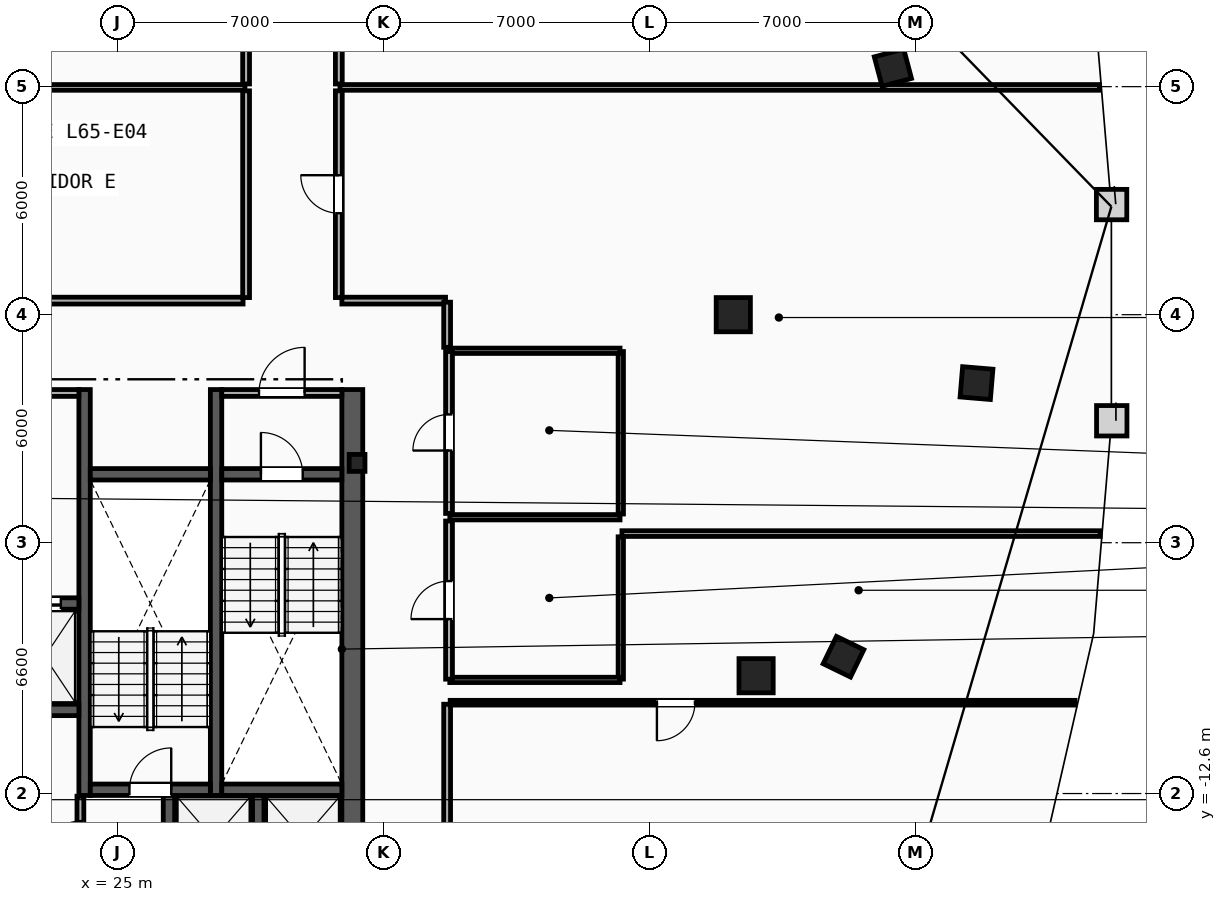
"""IFC4 building model, lengths in metres.
Left out: names, types, materials, properties, quantities, classifications, styles, units other than length and angle.
Written with IfcOpenShell. Run it as: python <this file> out.ifc"""

import sys

from ifc_helpers import new_model, si_unit, direction, frame, frame_2d, origin, origin_2d, place, context, subcontext, project, spatial, rectangle, i_section, extrude, element, fill, save


model = new_model("IFC4")
c1 = context("Model", 3, precision=1e-05, world=origin(), true_north=direction((0.0, 1.0)))
c2 = subcontext(c1, "Body", "Model", "MODEL_VIEW")
j1 = project(units=[si_unit("LENGTHUNIT", "METRE"), si_unit("PLANEANGLEUNIT", "RADIAN")], contexts=[c1])
p1 = place(None, origin())
s1 = spatial("IfcSite", under=j1, at=p1, CompositionType="ELEMENT")
p2 = place(p1, origin())
s2 = spatial("IfcBuilding", under=s1, at=p2, CompositionType="ELEMENT")
p3 = place(p2, frame((0.0, 0.0, 246.8)))
s3 = spatial("IfcBuildingStorey", under=s2, at=p3, CompositionType="ELEMENT", Elevation=246.8)
p4 = place(p3, frame((31.3, -3.9, 0.0), z_axis=(0.0, 0.0, 1.0), x_axis=(1.0, 0.0, 0.0)))
e1 = element("IfcColumn", 1, at=p4, inside=s3, PredefinedType="COLUMN", context=c2, shape_type="SweptSolid", body=[
    extrude(i_section(OverallWidth=0.416, OverallDepth=0.446, WebThickness=0.039, FlangeThickness=0.063, FilletRadius=0.018, at=origin_2d()), origin(), (0.0, 0.0, 1.0), 3.6),
])
for number, where, z_axis, x_axis in (
    (2, (41.2, 0.0, 0.0), (0.0, 0.0, 1.0), (1.0, 0.0, 0.0)),
    (3, (41.8, -9.5, 0.0), (0.0, 0.0, 1.0), (1.0, 0.0, 0.0)),
):
    element("IfcColumn", number, at=place(p3, frame(where, z_axis=z_axis, x_axis=x_axis)), inside=s3, PredefinedType="COLUMN", context=c2, shape_type="SweptSolid", body=[
        extrude(rectangle(XDim=0.9, YDim=0.9, at=origin_2d()), origin(), (0.0, 0.0, 1.0), 3.6),
    ])
for number, where, z_axis, x_axis in (
    (4, (44.1, -9.0, 0.0), (0.0, 0.0, 1.0), (0.437, 0.899, 0.0)),
    (5, (47.6, -1.8, 0.0), (0.0, 0.0, 1.0), (0.084, 0.997, 0.0)),
    (6, (45.4, 6.5, 0.0), (0.0, 0.0, 1.0), (-0.256, 0.967, 0.0)),
):
    element("IfcColumn", number, at=place(p3, frame(where, z_axis=z_axis, x_axis=x_axis)), inside=s3, PredefinedType="COLUMN", context=c2, shape_type="SweptSolid", body=[
        extrude(rectangle(XDim=0.8, YDim=0.8, at=origin_2d()), origin(), (0.0, 0.0, 1.0), 3.6),
    ])
p5 = place(p3, frame((31.175, -15.3, 0.0), z_axis=(0.0, 0.0, 1.0), x_axis=(0.0, 1.0, 0.0)))
e7 = element("IfcWall", 7, at=p5, inside=s3, PredefinedType="SHEAR", context=c2, shape_type="SweptSolid", body=[
    extrude(rectangle(XDim=13.33, YDim=0.55, at=frame_2d((6.665, 0.0))), origin(), (0.0, 0.0, 1.0), 3.34),
])
for number, where, z_axis, x_axis in (
    (8, (27.59, -12.65, 0.0), (0.0, 0.0, 1.0), (0.0, 1.0, 0.0)),
    (9, (24.13, -12.65, 0.0), (0.0, 0.0, 1.0), (0.0, 1.0, 0.0)),
):
    element("IfcWall", number, at=place(p3, frame(where, z_axis=z_axis, x_axis=x_axis)), inside=s3, PredefinedType="SHEAR", context=c2, shape_type="SweptSolid", body=[
        extrude(rectangle(XDim=10.68, YDim=0.3, at=frame_2d((5.34, 0.0))), origin(), (0.0, 0.0, 1.0), 3.34),
    ])
p6 = place(p3, frame((27.74, -4.2, 0.0), z_axis=(0.0, 0.0, 1.0), x_axis=(1.0, 0.0, 0.0)))
e10 = element("IfcWall", 10, at=p6, inside=s3, PredefinedType="SHEAR", context=c2, shape_type="SweptSolid", body=[
    extrude(rectangle(XDim=3.16, YDim=0.3, at=frame_2d((1.58, 0.0))), origin(), (0.0, 0.0, 1.0), 3.34),
])
p7 = place(p6, frame((1.03, 0.0, 0.0)))
e11 = element("IfcOpeningElement", 11, at=p7, cuts=e10, PredefinedType="OPENING", context=c2, shape_type="SweptSolid", body=[
    extrude(rectangle(XDim=1.1, YDim=2.15, at=frame_2d((0.55, 1.075))), frame((0.0, 0.16, 0.0), z_axis=(0.0, -1.0, 0.0), x_axis=(1.0, 0.0, 0.0)), (0.0, 0.0, 1.0), 0.32),
])
p8 = place(p3, frame((27.74, -12.5, 0.0), z_axis=(0.0, 0.0, 1.0), x_axis=(1.0, 0.0, 0.0)))
e12 = element("IfcWall", 12, at=p8, inside=s3, PredefinedType="SHEAR", context=c2, shape_type="SweptSolid", body=[
    extrude(rectangle(XDim=3.16, YDim=0.3, at=frame_2d((1.58, 0.0))), origin(), (0.0, 0.0, 1.0), 3.34),
])
p9 = place(p3, frame((24.28, -12.5, 0.0), z_axis=(0.0, 0.0, 1.0), x_axis=(1.0, 0.0, 0.0)))
e13 = element("IfcWall", 13, at=p9, inside=s3, PredefinedType="SHEAR", context=c2, shape_type="SweptSolid", body=[
    extrude(rectangle(XDim=3.16, YDim=0.3, at=frame_2d((1.58, 0.0))), origin(), (0.0, 0.0, 1.0), 3.34),
])
p10 = place(p9, frame((1.03, 0.0, 0.0)))
e14 = element("IfcOpeningElement", 14, at=p10, cuts=e13, PredefinedType="OPENING", context=c2, shape_type="SweptSolid", body=[
    extrude(rectangle(XDim=1.1, YDim=2.15, at=frame_2d((0.55, 1.075))), frame((0.0, 0.16, 0.0), z_axis=(0.0, -1.0, 0.0), x_axis=(1.0, 0.0, 0.0)), (0.0, 0.0, 1.0), 0.32),
])
p11 = place(p3, frame((24.28, -4.2, 0.0), z_axis=(0.0, 0.0, 1.0), x_axis=(1.0, 0.0, 0.0)))
e15 = element("IfcWall", 15, at=p11, inside=s3, PredefinedType="SHEAR", context=c2, shape_type="SweptSolid", body=[
    extrude(rectangle(XDim=3.16, YDim=0.3, at=frame_2d((1.58, 0.0))), origin(), (0.0, 0.0, 1.0), 3.34),
])
p12 = place(p3, frame((20.98, -2.06, 0.0), z_axis=(0.0, 0.0, 1.0), x_axis=(1.0, 0.0, 0.0)))
e16 = element("IfcWall", 16, at=p12, inside=s3, PredefinedType="PARTITIONING", context=c2, shape_type="SweptSolid", body=[
    extrude(rectangle(XDim=3.0, YDim=0.18, at=frame_2d((1.5, 0.0))), origin(), (0.0, 0.0, 1.0), 3.34),
])
p13 = place(p12, frame((0.9, 0.0, 0.0)))
e17 = element("IfcOpeningElement", 17, at=p13, cuts=e16, PredefinedType="OPENING", context=c2, shape_type="SweptSolid", body=[
    extrude(rectangle(XDim=1.2, YDim=2.15, at=frame_2d((0.6, 1.075))), frame((0.0, 0.1, 0.0), z_axis=(0.0, -1.0, 0.0), x_axis=(1.0, 0.0, 0.0)), (0.0, 0.0, 1.0), 0.2),
])
p14 = place(p3, frame((27.74, -2.06, 0.0), z_axis=(0.0, 0.0, 1.0), x_axis=(1.0, 0.0, 0.0)))
e18 = element("IfcWall", 18, at=p14, inside=s3, PredefinedType="PARTITIONING", context=c2, shape_type="SweptSolid", body=[
    extrude(rectangle(XDim=3.16, YDim=0.18, at=frame_2d((1.58, 0.0))), origin(), (0.0, 0.0, 1.0), 3.34),
])
p15 = place(p14, frame((0.98, 0.0, 0.0)))
e19 = element("IfcOpeningElement", 19, at=p15, cuts=e18, PredefinedType="OPENING", context=c2, shape_type="SweptSolid", body=[
    extrude(rectangle(XDim=1.2, YDim=2.15, at=frame_2d((0.6, 1.075))), frame((0.0, 0.1, 0.0), z_axis=(0.0, -1.0, 0.0), x_axis=(1.0, 0.0, 0.0)), (0.0, 0.0, 1.0), 0.2),
])
p16 = place(p3, frame((21.88, -7.6, 0.0), z_axis=(0.0, 0.0, 1.0), x_axis=(1.0, 0.0, 0.0)))
e20 = element("IfcWall", 20, at=p16, inside=s3, PredefinedType="SHEAR", context=c2, shape_type="SweptSolid", body=[
    extrude(rectangle(XDim=2.1, YDim=0.3, at=frame_2d((1.05, 0.0))), origin(), (0.0, 0.0, 1.0), 3.34),
])
p17 = place(p16, frame((0.475, 0.0, 0.0)))
e21 = element("IfcOpeningElement", 21, at=p17, cuts=e20, PredefinedType="OPENING", context=c2, shape_type="SweptSolid", body=[
    extrude(rectangle(XDim=1.15, YDim=2.2, at=frame_2d((0.575, 1.1))), frame((0.0, 0.16, 0.0), z_axis=(0.0, -1.0, 0.0), x_axis=(1.0, 0.0, 0.0)), (0.0, 0.0, 1.0), 0.32),
])
p18 = place(p3, frame((21.88, -10.4, 0.0), z_axis=(0.0, 0.0, 1.0), x_axis=(1.0, 0.0, 0.0)))
e22 = element("IfcWall", 22, at=p18, inside=s3, PredefinedType="SHEAR", context=c2, shape_type="SweptSolid", body=[
    extrude(rectangle(XDim=2.1, YDim=0.3, at=frame_2d((1.05, 0.0))), origin(), (0.0, 0.0, 1.0), 3.34),
])
for number, where, z_axis, x_axis in (
    (23, (28.7, -14.95, 0.0), (0.0, 0.0, 1.0), (0.0, 1.0, 0.0)),
    (24, (26.35, -14.95, 0.0), (0.0, 0.0, 1.0), (0.0, 1.0, 0.0)),
):
    element("IfcWall", number, at=place(p3, frame(where, z_axis=z_axis, x_axis=x_axis)), inside=s3, PredefinedType="SHEAR", context=c2, shape_type="SweptSolid", body=[
        extrude(rectangle(XDim=2.3, YDim=0.3, at=frame_2d((1.15, 0.0))), origin(), (0.0, 0.0, 1.0), 3.34),
    ])
p19 = place(p3, frame((24.02, -14.93, 0.0), z_axis=(0.0, 0.0, 1.0), x_axis=(0.0, 1.0, 0.0)))
e25 = element("IfcWall", 25, at=p19, inside=s3, PredefinedType="PARTITIONING", context=c2, shape_type="SweptSolid", body=[
    extrude(rectangle(XDim=2.26, YDim=0.18, at=frame_2d((1.13, 0.0))), origin(), (0.0, 0.0, 1.0), 3.34),
])
p20 = place(p19, frame((0.655, 0.0, 0.0)))
e26 = element("IfcOpeningElement", 26, at=p20, cuts=e25, PredefinedType="OPENING", context=c2, shape_type="SweptSolid", body=[
    extrude(rectangle(XDim=0.95, YDim=2.1, at=frame_2d((0.475, 1.05))), frame((0.0, 0.1, 0.0), z_axis=(0.0, -1.0, 0.0), x_axis=(1.0, 0.0, 0.0)), (0.0, 0.0, 1.0), 0.2),
])
p21 = place(p3, frame((38.24, -9.59, 0.0), z_axis=(0.0, 0.0, 1.0), x_axis=(0.0, 1.0, 0.0)))
e27 = element("IfcWall", 27, at=p21, inside=s3, PredefinedType="PARTITIONING", context=c2, shape_type="SweptSolid", body=[
    extrude(rectangle(XDim=3.745, YDim=0.14, at=frame_2d((1.873, 0.0))), origin(), (0.0, 0.0, 1.0), 3.34),
])
p22 = place(p3, frame((38.24, -5.245, 0.0), z_axis=(0.0, 0.0, 1.0), x_axis=(0.0, 1.0, 0.0)))
e28 = element("IfcWall", 28, at=p22, inside=s3, PredefinedType="PARTITIONING", context=c2, shape_type="SweptSolid", body=[
    extrude(rectangle(XDim=4.275, YDim=0.14, at=frame_2d((2.138, 0.0))), origin(), (0.0, 0.0, 1.0), 3.34),
])
for number, where, z_axis, x_axis in (
    (29, (33.74, -0.95, 0.0), (0.0, 0.0, 1.0), (1.0, 0.0, 0.0)),
    (30, (33.74, -5.33, 0.0), (0.0, 0.0, 1.0), (1.0, 0.0, 0.0)),
    (31, (33.74, -9.61, 0.0), (0.0, 0.0, 1.0), (1.0, 0.0, 0.0)),
):
    element("IfcWall", number, at=place(p3, frame(where, z_axis=z_axis, x_axis=x_axis)), inside=s3, PredefinedType="PARTITIONING", context=c2, shape_type="SweptSolid", body=[
        extrude(rectangle(XDim=4.48, YDim=0.14, at=frame_2d((2.24, 0.0))), origin(), (0.0, 0.0, 1.0), 3.34),
    ])
p23 = place(p3, frame((33.72, -5.23, 0.0), z_axis=(0.0, 0.0, 1.0), x_axis=(0.0, 1.0, 0.0)))
e32 = element("IfcWall", 32, at=p23, inside=s3, PredefinedType="PARTITIONING", context=c2, shape_type="SweptSolid", body=[
    extrude(rectangle(XDim=4.26, YDim=0.18, at=frame_2d((2.13, 0.0))), origin(), (0.0, 0.0, 1.0), 3.34),
])
p24 = place(p23, frame((1.655, 0.0, 0.0)))
e33 = element("IfcOpeningElement", 33, at=p24, cuts=e32, PredefinedType="OPENING", context=c2, shape_type="SweptSolid", body=[
    extrude(rectangle(XDim=0.95, YDim=2.1, at=frame_2d((0.475, 1.05))), frame((0.0, 0.1, 0.0), z_axis=(0.0, -1.0, 0.0), x_axis=(1.0, 0.0, 0.0)), (0.0, 0.0, 1.0), 0.2),
])
p25 = place(p3, frame((33.72, -9.59, 0.0), z_axis=(0.0, 0.0, 1.0), x_axis=(0.0, 1.0, 0.0)))
e34 = element("IfcWall", 34, at=p25, inside=s3, PredefinedType="PARTITIONING", context=c2, shape_type="SweptSolid", body=[
    extrude(rectangle(XDim=4.16, YDim=0.18, at=frame_2d((2.08, 0.0))), origin(), (0.0, 0.0, 1.0), 3.34),
])
p26 = place(p25, frame((1.58, 0.0, 0.0)))
e35 = element("IfcOpeningElement", 35, at=p26, cuts=e34, PredefinedType="OPENING", context=c2, shape_type="SweptSolid", body=[
    extrude(rectangle(XDim=1.0, YDim=2.15, at=frame_2d((0.5, 1.075))), frame((0.0, 0.1, 0.0), z_axis=(0.0, -1.0, 0.0), x_axis=(1.0, 0.0, 0.0)), (0.0, 0.0, 1.0), 0.2),
])
p27 = place(p3, frame((13.165, 5.98, 0.0), z_axis=(0.0, 0.0, 1.0), x_axis=(1.0, 0.0, 0.0)))
e36 = element("IfcWall", 36, at=p27, inside=s3, PredefinedType="PARTITIONING", context=c2, shape_type="SweptSolid", body=[
    extrude(rectangle(XDim=15.185, YDim=0.15, at=frame_2d((7.593, 0.0))), origin(), (0.0, 0.0, 1.0), 3.34),
])
p28 = place(p3, frame((30.85, 5.98, 0.0), z_axis=(0.0, 0.0, 1.0), x_axis=(1.0, 0.0, 0.0)))
e37 = element("IfcWall", 37, at=p28, inside=s3, PredefinedType="PARTITIONING", context=c2, shape_type="SweptSolid", body=[
    extrude(rectangle(XDim=19.985, YDim=0.15, at=frame_2d((9.993, 0.0))), origin(), (0.0, 0.0, 1.0), 3.34),
])
p29 = place(p3, frame((38.27, -5.76, 0.0), z_axis=(0.0, 0.0, 1.0), x_axis=(1.0, 0.0, 0.0)))
e38 = element("IfcWall", 38, at=p29, inside=s3, PredefinedType="PARTITIONING", context=c2, shape_type="SweptSolid", body=[
    extrude(rectangle(XDim=12.584, YDim=0.15, at=frame_2d((6.292, 0.0))), origin(), (0.0, 0.0, 1.0), 3.34),
])
p30 = place(p3, frame((33.67, -17.428, 0.0), z_axis=(0.0, 0.0, 1.0), x_axis=(0.0, 1.0, 0.0)))
e39 = element("IfcWall", 39, at=p30, inside=s3, PredefinedType="PARTITIONING", context=c2, shape_type="SweptSolid", body=[
    extrude(rectangle(XDim=7.178, YDim=0.18, at=frame_2d((3.589, 0.0))), origin(), (0.0, 0.0, 1.0), 3.34),
])
p31 = place(p3, frame((30.82, 0.45, 0.0), z_axis=(0.0, 0.0, 1.0), x_axis=(0.0, 1.0, 0.0)))
e40 = element("IfcWall", 40, at=p31, inside=s3, PredefinedType="PARTITIONING", context=c2, shape_type="SweptSolid", body=[
    extrude(rectangle(XDim=5.44, YDim=0.18, at=frame_2d((2.72, 0.0))), origin(), (0.0, 0.0, 1.0), 3.34),
])
p32 = place(p31, frame((2.22, 0.0, 0.0)))
e41 = element("IfcOpeningElement", 41, at=p32, cuts=e40, PredefinedType="OPENING", context=c2, shape_type="SweptSolid", body=[
    extrude(rectangle(XDim=1.0, YDim=2.15, at=frame_2d((0.5, 1.075))), frame((0.0, 0.1, 0.0), z_axis=(0.0, -1.0, 0.0), x_axis=(1.0, 0.0, 0.0)), (0.0, 0.0, 1.0), 0.2),
])
p33 = place(p3, frame((33.628, 0.37, 0.0), z_axis=(0.0, 0.0, 1.0), x_axis=(-1.0, 0.0, 0.0)))
e42 = element("IfcWall", 42, at=p33, inside=s3, PredefinedType="PARTITIONING", context=c2, shape_type="SweptSolid", body=[
    extrude(rectangle(XDim=2.729, YDim=0.18, at=frame_2d((1.364, 0.0))), origin(), (0.0, 0.0, 1.0), 3.34),
])
p34 = place(p3, frame((33.67, -0.859, 0.0), z_axis=(0.0, 0.0, 1.0), x_axis=(0.0, 1.0, 0.0)))
e43 = element("IfcWall", 43, at=p34, inside=s3, PredefinedType="PARTITIONING", context=c2, shape_type="SweptSolid", body=[
    extrude(rectangle(XDim=1.187, YDim=0.18, at=frame_2d((0.594, 0.0))), origin(), (0.0, 0.0, 1.0), 3.34),
])
p35 = place(p3, frame((28.3, 0.37, 0.0), z_axis=(0.0, 0.0, 1.0), x_axis=(-1.0, 0.0, 0.0)))
e44 = element("IfcWall", 44, at=p35, inside=s3, PredefinedType="PARTITIONING", context=c2, shape_type="SweptSolid", body=[
    extrude(rectangle(XDim=11.4, YDim=0.18, at=frame_2d((5.7, 0.0))), origin(), (0.0, 0.0, 1.0), 3.34),
])
p36 = place(p35, frame((5.2, 0.0, 0.0)))
e45 = element("IfcOpeningElement", 45, at=p36, cuts=e44, PredefinedType="OPENING", context=c2, shape_type="SweptSolid", body=[
    extrude(rectangle(XDim=1.0, YDim=2.15, at=frame_2d((0.5, 1.075))), frame((0.0, 0.1, 0.0), z_axis=(0.0, -1.0, 0.0), x_axis=(1.0, 0.0, 0.0)), (0.0, 0.0, 1.0), 0.2),
])
p37 = place(p3, frame((28.38, 5.89, 0.0), z_axis=(0.0, 0.0, 1.0), x_axis=(0.0, -1.0, 0.0)))
e46 = element("IfcWall", 46, at=p37, inside=s3, PredefinedType="PARTITIONING", context=c2, shape_type="SweptSolid", body=[
    extrude(rectangle(XDim=5.44, YDim=0.18, at=frame_2d((2.72, 0.0))), origin(), (0.0, 0.0, 1.0), 3.34),
])
p38 = place(p3, frame((28.38, 12.43, 0.0), z_axis=(0.0, 0.0, 1.0), x_axis=(0.0, -1.0, 0.0)))
e47 = element("IfcWall", 47, at=p38, inside=s3, PredefinedType="PARTITIONING", context=c2, shape_type="SweptSolid", body=[
    extrude(rectangle(XDim=6.36, YDim=0.18, at=frame_2d((3.18, 0.0))), origin(), (0.0, 0.0, 1.0), 3.34),
])
p39 = place(p38, frame((2.68, 0.0, 0.0)))
e48 = element("IfcOpeningElement", 48, at=p39, cuts=e47, PredefinedType="OPENING", context=c2, shape_type="SweptSolid", body=[
    extrude(rectangle(XDim=1.0, YDim=2.15, at=frame_2d((0.5, 1.075))), frame((0.0, 0.1, 0.0), z_axis=(0.0, -1.0, 0.0), x_axis=(1.0, 0.0, 0.0)), (0.0, 0.0, 1.0), 0.2),
])
p40 = place(p3, frame((30.82, 6.07, 0.0), z_axis=(0.0, 0.0, 1.0), x_axis=(0.0, 1.0, 0.0)))
e49 = element("IfcWall", 49, at=p40, inside=s3, PredefinedType="PARTITIONING", context=c2, shape_type="SweptSolid", body=[
    extrude(rectangle(XDim=6.36, YDim=0.18, at=frame_2d((3.18, 0.0))), origin(), (0.0, 0.0, 1.0), 3.34),
])
p41 = place(p40, frame((2.68, 0.0, 0.0)))
e50 = element("IfcOpeningElement", 50, at=p41, cuts=e49, PredefinedType="OPENING", context=c2, shape_type="SweptSolid", body=[
    extrude(rectangle(XDim=1.0, YDim=2.15, at=frame_2d((0.5, 1.075))), frame((0.0, 0.1, 0.0), z_axis=(0.0, -1.0, 0.0), x_axis=(1.0, 0.0, 0.0)), (0.0, 0.0, 1.0), 0.2),
])
p42 = place(p3, frame((50.191, -10.21, 0.0), z_axis=(0.0, 0.0, 1.0), x_axis=(-1.0, 0.0, 0.0)))
e51 = element("IfcWall", 51, at=p42, inside=s3, PredefinedType="PARTITIONING", context=c2, shape_type="SweptSolid", body=[
    extrude(rectangle(XDim=16.441, YDim=0.125, at=frame_2d((8.221, 0.0))), origin(), (0.0, 0.0, 1.0), 3.34),
])
p43 = place(p42, frame((10.001, 0.0, 0.0)))
e52 = element("IfcOpeningElement", 52, at=p43, cuts=e51, PredefinedType="OPENING", context=c2, shape_type="SweptSolid", body=[
    extrude(rectangle(XDim=1.0, YDim=2.15, at=frame_2d((0.5, 1.075))), frame((0.0, 0.073, 0.0), z_axis=(0.0, -1.0, 0.0), x_axis=(1.0, 0.0, 0.0)), (0.0, 0.0, 1.0), 0.145),
])
p44 = place(p7, origin())
e53 = element("IfcDoor", 53, at=p44, inside=s3, OperationType="SINGLE_SWING_LEFT", PredefinedType="DOOR", context=c2, shape_type="SweptSolid", body=[
    extrude(rectangle(XDim=1.1, YDim=2.15, at=frame_2d((0.55, 1.075))), frame((0.0, 0.025, 0.0), z_axis=(0.0, -1.0, 0.0), x_axis=(1.0, 0.0, 0.0)), (0.0, 0.0, 1.0), 0.05),
])
fill(e11, e53)
p45 = place(p10, origin())
e54 = element("IfcDoor", 54, at=p45, inside=s3, OperationType="SINGLE_SWING_RIGHT", PredefinedType="DOOR", context=c2, shape_type="SweptSolid", body=[
    extrude(rectangle(XDim=1.1, YDim=2.15, at=frame_2d((0.55, 1.075))), frame((0.0, 0.025, 0.0), z_axis=(0.0, -1.0, 0.0), x_axis=(1.0, 0.0, 0.0)), (0.0, 0.0, 1.0), 0.05),
])
fill(e14, e54)
p46 = place(p15, origin())
e55 = element("IfcDoor", 55, at=p46, inside=s3, OperationType="SINGLE_SWING_RIGHT", PredefinedType="DOOR", context=c2, shape_type="SweptSolid", body=[
    extrude(rectangle(XDim=1.2, YDim=2.15, at=frame_2d((0.6, 1.075))), frame((0.0, 0.025, 0.0), z_axis=(0.0, -1.0, 0.0), x_axis=(1.0, 0.0, 0.0)), (0.0, 0.0, 1.0), 0.05),
])
fill(e19, e55)
p47 = place(p17, origin())
e56 = element("IfcDoor", 56, at=p47, inside=s3, OperationType="SLIDING_TO_LEFT", PredefinedType="TRAPDOOR", context=c2, shape_type="SweptSolid", body=[
    extrude(rectangle(XDim=1.15, YDim=2.2, at=frame_2d((0.575, 1.1))), frame((0.0, 0.025, 0.0), z_axis=(0.0, -1.0, 0.0), x_axis=(1.0, 0.0, 0.0)), (0.0, 0.0, 1.0), 0.05),
])
fill(e21, e56)
p48 = place(p43, origin())
e57 = element("IfcDoor", 57, at=p48, inside=s3, OperationType="SINGLE_SWING_RIGHT", PredefinedType="DOOR", context=c2, shape_type="SweptSolid", body=[
    extrude(rectangle(XDim=1.0, YDim=2.15, at=frame_2d((0.5, 1.075))), frame((0.0, 0.025, 0.0), z_axis=(0.0, -1.0, 0.0), x_axis=(1.0, 0.0, 0.0)), (0.0, 0.0, 1.0), 0.05),
])
fill(e52, e57)
p49 = place(p32, origin())
e58 = element("IfcDoor", 58, at=p49, inside=s3, OperationType="SINGLE_SWING_RIGHT", PredefinedType="DOOR", context=c2, shape_type="SweptSolid", body=[
    extrude(rectangle(XDim=1.0, YDim=2.15, at=frame_2d((0.5, 1.075))), frame((0.0, 0.025, 0.0), z_axis=(0.0, -1.0, 0.0), x_axis=(1.0, 0.0, 0.0)), (0.0, 0.0, 1.0), 0.05),
])
fill(e41, e58)
p50 = place(p24, origin())
e59 = element("IfcDoor", 59, at=p50, inside=s3, OperationType="SINGLE_SWING_LEFT", PredefinedType="DOOR", context=c2, shape_type="SweptSolid", body=[
    extrude(rectangle(XDim=0.95, YDim=2.1, at=frame_2d((0.475, 1.05))), frame((0.0, 0.025, 0.0), z_axis=(0.0, -1.0, 0.0), x_axis=(1.0, 0.0, 0.0)), (0.0, 0.0, 1.0), 0.05),
])
fill(e33, e59)
p51 = place(p26, origin())
e60 = element("IfcDoor", 60, at=p51, inside=s3, OperationType="SINGLE_SWING_LEFT", PredefinedType="DOOR", context=c2, shape_type="SweptSolid", body=[
    extrude(rectangle(XDim=1.0, YDim=2.15, at=frame_2d((0.5, 1.075))), frame((0.0, 0.025, 0.0), z_axis=(0.0, -1.0, 0.0), x_axis=(1.0, 0.0, 0.0)), (0.0, 0.0, 1.0), 0.05),
])
fill(e35, e60)
p52 = place(p20, origin())
e61 = element("IfcDoor", 61, at=p52, inside=s3, OperationType="SINGLE_SWING_LEFT", PredefinedType="DOOR", context=c2, shape_type="SweptSolid", body=[
    extrude(rectangle(XDim=0.95, YDim=2.1, at=frame_2d((0.475, 1.05))), frame((0.0, 0.025, 0.0), z_axis=(0.0, -1.0, 0.0), x_axis=(1.0, 0.0, 0.0)), (0.0, 0.0, 1.0), 0.05),
])
fill(e26, e61)
save(model, sys.argv[1])
